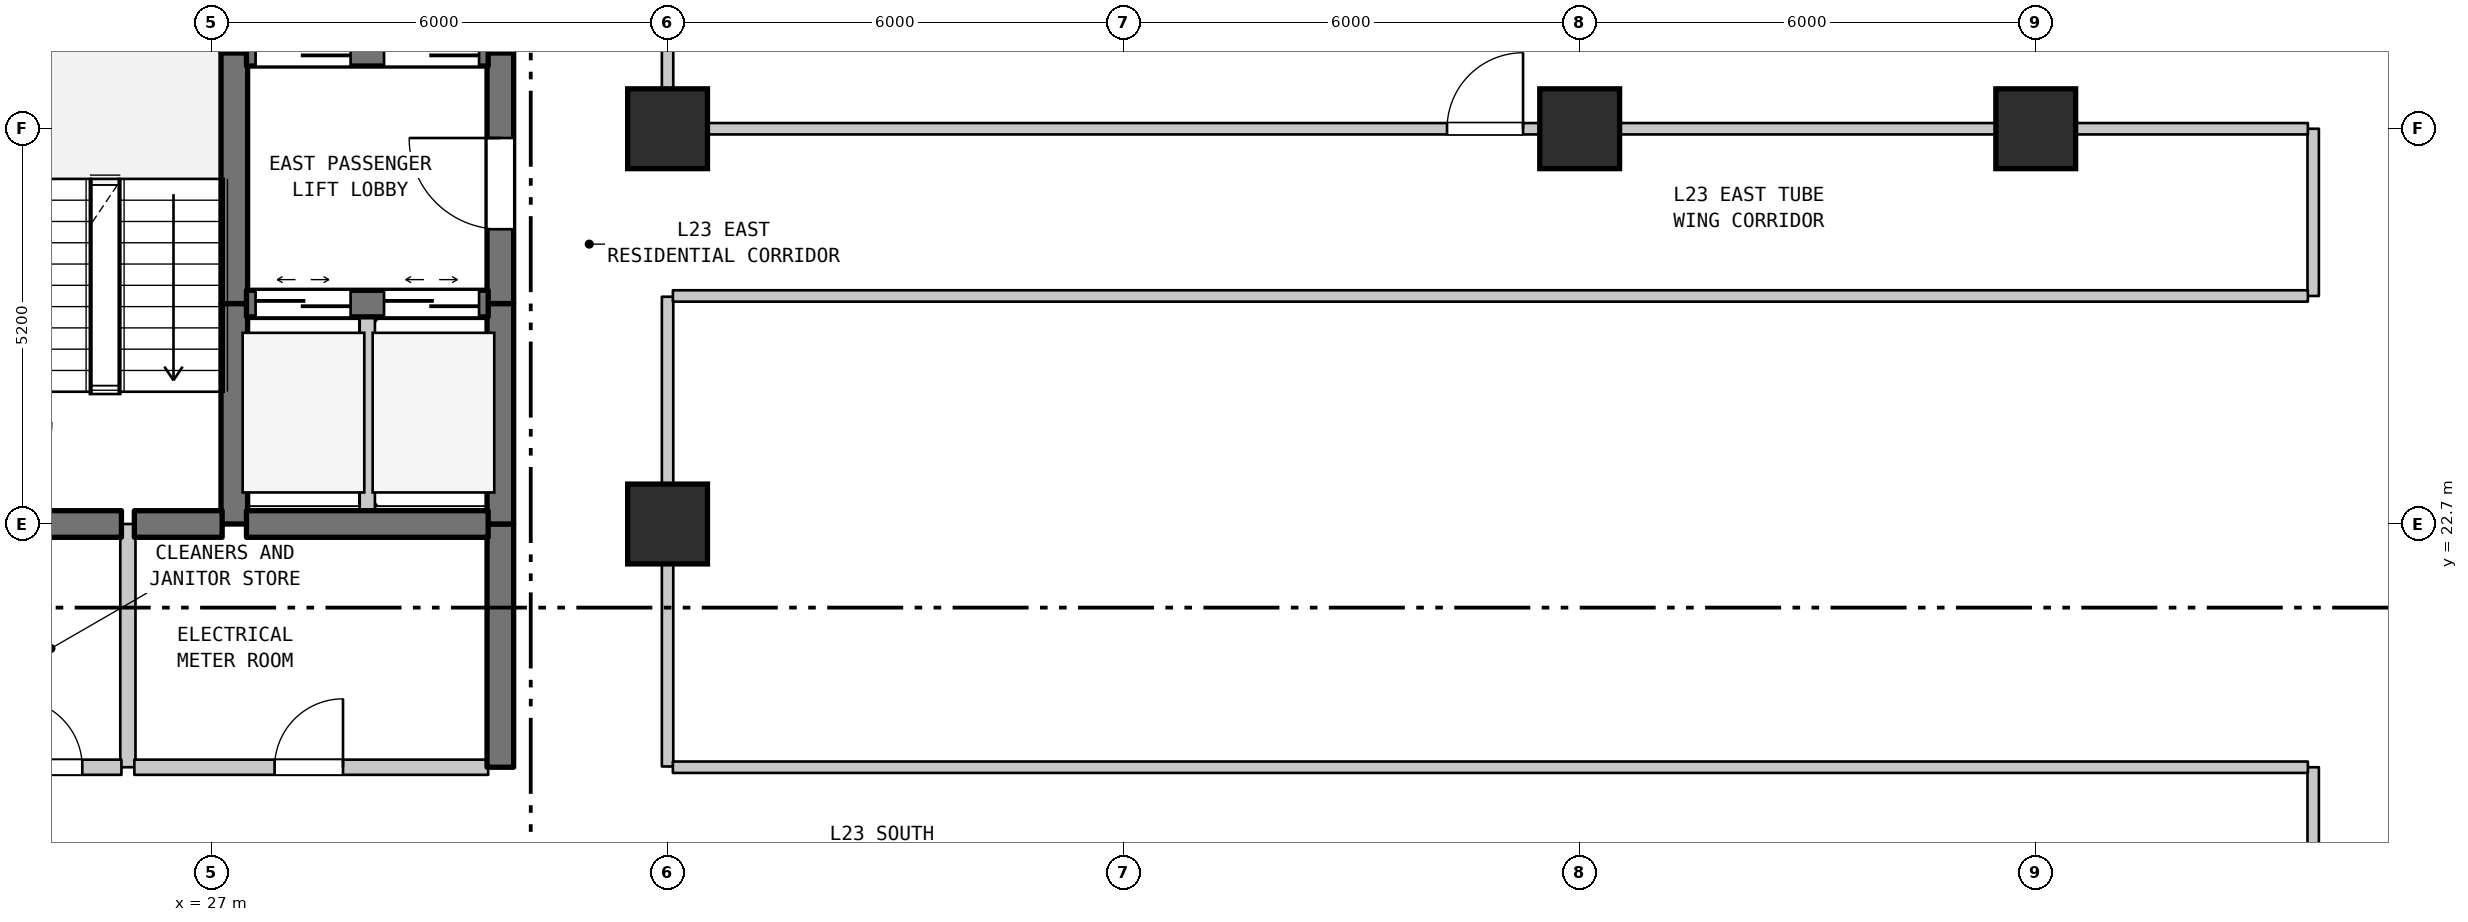
"""IFC4 building model, lengths in metres.
Left out: names, types, materials, properties, quantities, classifications, styles, units other than length and angle.
Written with IfcOpenShell. Run it as: python <this file> out.ifc"""

import sys

from ifc_helpers import new_model, si_unit, direction, frame, frame_2d, origin, origin_2d, place, context, subcontext, project, spatial, rectangle, extrude, element, fill, save


model = new_model("IFC4")
c1 = context("Model", 3, precision=1e-05, world=origin(), true_north=direction((0.0, 1.0)))
c2 = subcontext(c1, "Body", "Model", "MODEL_VIEW")
j1 = project(units=[si_unit("LENGTHUNIT", "METRE"), si_unit("PLANEANGLEUNIT", "RADIAN")], contexts=[c1])
p1 = place(None, origin())
s1 = spatial("IfcSite", under=j1, at=p1, CompositionType="ELEMENT")
p2 = place(p1, origin())
s2 = spatial("IfcBuilding", under=s1, at=p2, CompositionType="ELEMENT")
p3 = place(p2, frame((0.0, 0.0, 98.3)))
s3 = spatial("IfcBuildingStorey", under=s2, at=p3, CompositionType="ELEMENT", Elevation=98.3)
for number, where, z_axis, x_axis in (
    (1, (33.0, 22.7, 0.0), (0.0, 0.0, 1.0), (1.0, 0.0, 0.0)),
    (2, (33.0, 27.9, 0.0), (0.0, 0.0, 1.0), (1.0, 0.0, 0.0)),
    (3, (45.0, 27.9, 0.0), (0.0, 0.0, 1.0), (1.0, 0.0, 0.0)),
    (4, (51.0, 27.9, 0.0), (0.0, 0.0, 1.0), (1.0, 0.0, 0.0)),
):
    element("IfcColumn", number, at=place(p3, frame(where, z_axis=z_axis, x_axis=x_axis)), inside=s3, PredefinedType="COLUMN", context=c2, shape_type="SweptSolid", body=[
        extrude(rectangle(XDim=1.05, YDim=1.05, at=origin_2d()), origin(), (0.0, 0.0, 1.0), 3.7),
    ])
p4 = place(p3, frame((25.9, 19.5, 0.0), z_axis=(0.0, 0.0, 1.0), x_axis=(0.0, 1.0, 0.0)))
e5 = element("IfcWall", 5, at=p4, inside=s3, PredefinedType="STANDARD", context=c2, shape_type="SweptSolid", body=[
    extrude(rectangle(XDim=3.2, YDim=0.2, at=frame_2d((1.6, 0.0))), origin(), (0.0, 0.0, 1.0), 3.385),
])
p5 = place(p3, frame((27.3, 22.7, 0.0), z_axis=(0.0, 0.0, 1.0), x_axis=(0.0, 1.0, 0.0)))
e6 = element("IfcWall", 6, at=p5, inside=s3, PredefinedType="SHEAR", context=c2, shape_type="SweptSolid", body=[
    extrude(rectangle(XDim=2.9, YDim=0.35, at=frame_2d((1.45, 0.0))), origin(), (0.0, 0.0, 1.0), 3.385),
])
p6 = place(p3, frame((27.3, 25.6, 0.0), z_axis=(0.0, 0.0, 1.0), x_axis=(0.0, 1.0, 0.0)))
e7 = element("IfcWall", 7, at=p6, inside=s3, PredefinedType="SHEAR", context=c2, shape_type="SweptSolid", body=[
    extrude(rectangle(XDim=3.3, YDim=0.35, at=frame_2d((1.65, 0.0))), origin(), (0.0, 0.0, 1.0), 3.385),
])
p7 = place(p3, frame((29.05, 22.7, 0.0), z_axis=(0.0, 0.0, 1.0), x_axis=(0.0, 1.0, 0.0)))
e8 = element("IfcWall", 8, at=p7, inside=s3, PredefinedType="STANDARD", context=c2, shape_type="SweptSolid", body=[
    extrude(rectangle(XDim=2.9, YDim=0.2, at=frame_2d((1.45, 0.0))), origin(), (0.0, 0.0, 1.0), 3.385),
])
p8 = place(p3, frame((30.8, 19.5, 0.0), z_axis=(0.0, 0.0, 1.0), x_axis=(0.0, 1.0, 0.0)))
e9 = element("IfcWall", 9, at=p8, inside=s3, PredefinedType="SHEAR", context=c2, shape_type="SweptSolid", body=[
    extrude(rectangle(XDim=3.2, YDim=0.35, at=frame_2d((1.6, 0.0))), origin(), (0.0, 0.0, 1.0), 3.385),
])
p9 = place(p3, frame((30.8, 22.7, 0.0), z_axis=(0.0, 0.0, 1.0), x_axis=(0.0, 1.0, 0.0)))
e10 = element("IfcWall", 10, at=p9, inside=s3, PredefinedType="SHEAR", context=c2, shape_type="SweptSolid", body=[
    extrude(rectangle(XDim=2.9, YDim=0.35, at=frame_2d((1.45, 0.0))), origin(), (0.0, 0.0, 1.0), 3.385),
])
p10 = place(p3, frame((30.8, 25.6, 0.0), z_axis=(0.0, 0.0, 1.0), x_axis=(0.0, 1.0, 0.0)))
e11 = element("IfcWall", 11, at=p10, inside=s3, PredefinedType="SHEAR", context=c2, shape_type="SweptSolid", body=[
    extrude(rectangle(XDim=3.3, YDim=0.35, at=frame_2d((1.65, 0.0))), origin(), (0.0, 0.0, 1.0), 3.385),
])
p11 = place(p10, frame((0.978, 0.0, 0.0)))
e12 = element("IfcOpeningElement", 12, at=p11, cuts=e11, PredefinedType="OPENING", context=c2, shape_type="SweptSolid", body=[
    extrude(rectangle(XDim=1.2, YDim=2.2, at=frame_2d((0.6, 1.1))), frame((0.0, 0.185, 0.0), z_axis=(0.0, -1.0, 0.0), x_axis=(1.0, 0.0, 0.0)), (0.0, 0.0, 1.0), 0.37),
])
p12 = place(p3, frame((33.0, 19.51, 0.0), z_axis=(0.0, 0.0, 1.0), x_axis=(0.0, 1.0, 0.0)))
e13 = element("IfcWall", 13, at=p12, inside=s3, PredefinedType="STANDARD", context=c2, shape_type="SweptSolid", body=[
    extrude(rectangle(XDim=6.18, YDim=0.15, at=frame_2d((3.09, 0.0))), origin(), (0.0, 0.0, 1.0), 2.935),
])
p13 = place(p3, frame((33.0, 27.91, 0.0), z_axis=(0.0, 0.0, 1.0), x_axis=(0.0, 1.0, 0.0)))
e14 = element("IfcWall", 14, at=p13, inside=s3, PredefinedType="STANDARD", context=c2, shape_type="SweptSolid", body=[
    extrude(rectangle(XDim=9.98, YDim=0.15, at=frame_2d((4.99, 0.0))), origin(), (0.0, 0.0, 1.0), 2.885),
])
p14 = place(p3, frame((54.65, 17.31, 0.0), z_axis=(0.0, 0.0, 1.0), x_axis=(0.0, 1.0, 0.0)))
e15 = element("IfcWall", 15, at=p14, inside=s3, PredefinedType="STANDARD", context=c2, shape_type="SweptSolid", body=[
    extrude(rectangle(XDim=2.19, YDim=0.15, at=frame_2d((1.095, 0.0))), origin(), (0.0, 0.0, 1.0), 3.385),
])
p15 = place(p3, frame((54.65, 25.7, 0.0), z_axis=(0.0, 0.0, 1.0), x_axis=(0.0, 1.0, 0.0)))
e16 = element("IfcWall", 16, at=p15, inside=s3, PredefinedType="STANDARD", context=c2, shape_type="SweptSolid", body=[
    extrude(rectangle(XDim=2.2, YDim=0.15, at=frame_2d((1.1, 0.0))), origin(), (0.0, 0.0, 1.0), 3.385),
])
p16 = place(p3, frame((23.96, 19.5, 0.0), z_axis=(0.0, 0.0, 1.0), x_axis=(1.0, 0.0, 0.0)))
e17 = element("IfcWall", 17, at=p16, inside=s3, PredefinedType="STANDARD", context=c2, shape_type="SweptSolid", body=[
    extrude(rectangle(XDim=1.855, YDim=0.2, at=frame_2d((0.927, 0.0))), origin(), (0.0, 0.0, 1.0), 3.385),
])
p17 = place(p16, frame((0.44, 0.0, 0.0)))
e18 = element("IfcOpeningElement", 18, at=p17, cuts=e17, PredefinedType="OPENING", context=c2, shape_type="SweptSolid", body=[
    extrude(rectangle(XDim=0.9, YDim=2.15, at=frame_2d((0.45, 1.075))), frame((0.0, 0.11, 0.0), z_axis=(0.0, -1.0, 0.0), x_axis=(1.0, 0.0, 0.0)), (0.0, 0.0, 1.0), 0.22),
])
p18 = place(p3, frame((25.985, 19.5, 0.0), z_axis=(0.0, 0.0, 1.0), x_axis=(1.0, 0.0, 0.0)))
e19 = element("IfcWall", 19, at=p18, inside=s3, PredefinedType="STANDARD", context=c2, shape_type="SweptSolid", body=[
    extrude(rectangle(XDim=4.655, YDim=0.2, at=frame_2d((2.327, 0.0))), origin(), (0.0, 0.0, 1.0), 3.385),
])
p19 = place(p18, frame((1.845, 0.0, 0.0)))
e20 = element("IfcOpeningElement", 20, at=p19, cuts=e19, PredefinedType="OPENING", context=c2, shape_type="SweptSolid", body=[
    extrude(rectangle(XDim=0.9, YDim=2.15, at=frame_2d((0.45, 1.075))), frame((0.0, 0.11, 0.0), z_axis=(0.0, -1.0, 0.0), x_axis=(1.0, 0.0, 0.0)), (0.0, 0.0, 1.0), 0.22),
])
p20 = place(p3, frame((33.07, 19.5, 0.0), z_axis=(0.0, 0.0, 1.0), x_axis=(1.0, 0.0, 0.0)))
e21 = element("IfcWall", 21, at=p20, inside=s3, PredefinedType="STANDARD", context=c2, shape_type="SweptSolid", body=[
    extrude(rectangle(XDim=21.51, YDim=0.15, at=frame_2d((10.755, 0.0))), origin(), (0.0, 0.0, 1.0), 3.385),
])
p21 = place(p3, frame((23.96, 22.7, 0.0), z_axis=(0.0, 0.0, 1.0), x_axis=(1.0, 0.0, 0.0)))
e22 = element("IfcWall", 22, at=p21, inside=s3, PredefinedType="SHEAR", context=c2, shape_type="SweptSolid", body=[
    extrude(rectangle(XDim=1.855, YDim=0.35, at=frame_2d((0.927, 0.0))), origin(), (0.0, 0.0, 1.0), 3.385),
])
p22 = place(p3, frame((25.985, 22.7, 0.0), z_axis=(0.0, 0.0, 1.0), x_axis=(1.0, 0.0, 0.0)))
e23 = element("IfcWall", 23, at=p22, inside=s3, PredefinedType="SHEAR", context=c2, shape_type="SweptSolid", body=[
    extrude(rectangle(XDim=1.155, YDim=0.35, at=frame_2d((0.577, 0.0))), origin(), (0.0, 0.0, 1.0), 3.385),
])
p23 = place(p3, frame((27.46, 22.7, 0.0), z_axis=(0.0, 0.0, 1.0), x_axis=(1.0, 0.0, 0.0)))
e24 = element("IfcWall", 24, at=p23, inside=s3, PredefinedType="SHEAR", context=c2, shape_type="SweptSolid", body=[
    extrude(rectangle(XDim=3.18, YDim=0.35, at=frame_2d((1.59, 0.0))), origin(), (0.0, 0.0, 1.0), 3.385),
])
p24 = place(p3, frame((27.46, 25.6, 0.0), z_axis=(0.0, 0.0, 1.0), x_axis=(1.0, 0.0, 0.0)))
e25 = element("IfcWall", 25, at=p24, inside=s3, PredefinedType="SHEAR", context=c2, shape_type="SweptSolid", body=[
    extrude(rectangle(XDim=3.18, YDim=0.35, at=frame_2d((1.59, 0.0))), origin(), (0.0, 0.0, 1.0), 3.385),
])
p25 = place(p24, frame((0.12, 0.0, 0.0)))
e26 = element("IfcOpeningElement", 26, at=p25, cuts=e25, PredefinedType="OPENING", context=c2, shape_type="SweptSolid", body=[
    extrude(rectangle(XDim=1.25, YDim=2.2, at=frame_2d((0.625, 1.1))), frame((0.0, 0.185, 0.0), z_axis=(0.0, -1.0, 0.0), x_axis=(1.0, 0.0, 0.0)), (0.0, 0.0, 1.0), 0.37),
])
p26 = place(p24, frame((1.81, 0.0, 0.0)))
e27 = element("IfcOpeningElement", 27, at=p26, cuts=e25, PredefinedType="OPENING", context=c2, shape_type="SweptSolid", body=[
    extrude(rectangle(XDim=1.25, YDim=2.2, at=frame_2d((0.625, 1.1))), frame((0.0, 0.185, 0.0), z_axis=(0.0, -1.0, 0.0), x_axis=(1.0, 0.0, 0.0)), (0.0, 0.0, 1.0), 0.37),
])
p27 = place(p3, frame((33.07, 25.7, 0.0), z_axis=(0.0, 0.0, 1.0), x_axis=(1.0, 0.0, 0.0)))
e28 = element("IfcWall", 28, at=p27, inside=s3, PredefinedType="STANDARD", context=c2, shape_type="SweptSolid", body=[
    extrude(rectangle(XDim=21.51, YDim=0.15, at=frame_2d((10.755, 0.0))), origin(), (0.0, 0.0, 1.0), 3.385),
])
p28 = place(p3, frame((33.07, 27.9, 0.0), z_axis=(0.0, 0.0, 1.0), x_axis=(1.0, 0.0, 0.0)))
e29 = element("IfcWall", 29, at=p28, inside=s3, PredefinedType="STANDARD", context=c2, shape_type="SweptSolid", body=[
    extrude(rectangle(XDim=11.93, YDim=0.15, at=frame_2d((5.965, 0.0))), origin(), (0.0, 0.0, 1.0), 2.885),
])
p29 = place(p28, frame((10.185, 0.0, 0.0)))
e30 = element("IfcOpeningElement", 30, at=p29, cuts=e29, PredefinedType="OPENING", context=c2, shape_type="SweptSolid", body=[
    extrude(rectangle(XDim=1.0, YDim=2.15, at=frame_2d((0.5, 1.075))), frame((0.0, 0.085, 0.0), z_axis=(0.0, -1.0, 0.0), x_axis=(1.0, 0.0, 0.0)), (0.0, 0.0, 1.0), 0.17),
])
p30 = place(p3, frame((27.46, 28.9, 0.0), z_axis=(0.0, 0.0, 1.0), x_axis=(1.0, 0.0, 0.0)))
e31 = element("IfcWall", 31, at=p30, inside=s3, PredefinedType="SHEAR", context=c2, shape_type="SweptSolid", body=[
    extrude(rectangle(XDim=3.18, YDim=0.35, at=frame_2d((1.59, 0.0))), origin(), (0.0, 0.0, 1.0), 3.385),
])
p31 = place(p30, frame((0.12, 0.0, 0.0)))
e32 = element("IfcOpeningElement", 32, at=p31, cuts=e31, PredefinedType="OPENING", context=c2, shape_type="SweptSolid", body=[
    extrude(rectangle(XDim=1.25, YDim=2.2, at=frame_2d((0.625, 1.1))), frame((0.0, 0.185, 0.0), z_axis=(0.0, -1.0, 0.0), x_axis=(1.0, 0.0, 0.0)), (0.0, 0.0, 1.0), 0.37),
])
p32 = place(p30, frame((1.81, 0.0, 0.0)))
e33 = element("IfcOpeningElement", 33, at=p32, cuts=e31, PredefinedType="OPENING", context=c2, shape_type="SweptSolid", body=[
    extrude(rectangle(XDim=1.25, YDim=2.2, at=frame_2d((0.625, 1.1))), frame((0.0, 0.185, 0.0), z_axis=(0.0, -1.0, 0.0), x_axis=(1.0, 0.0, 0.0)), (0.0, 0.0, 1.0), 0.37),
])
p33 = place(p3, frame((45.0, 27.9, 0.0), z_axis=(0.0, 0.0, 1.0), x_axis=(1.0, 0.0, 0.0)))
e34 = element("IfcWall", 34, at=p33, inside=s3, PredefinedType="STANDARD", context=c2, shape_type="SweptSolid", body=[
    extrude(rectangle(XDim=9.58, YDim=0.15, at=frame_2d((4.79, 0.0))), origin(), (0.0, 0.0, 1.0), 2.935),
])
p34 = place(p11, origin())
e35 = element("IfcDoor", 35, at=p34, inside=s3, OperationType="SINGLE_SWING_RIGHT", PredefinedType="DOOR", context=c2, shape_type="SweptSolid", body=[
    extrude(rectangle(XDim=1.2, YDim=2.2, at=frame_2d((0.6, 1.1))), frame((0.0, 0.025, 0.0), z_axis=(0.0, -1.0, 0.0), x_axis=(1.0, 0.0, 0.0)), (0.0, 0.0, 1.0), 0.05),
])
fill(e12, e35)
p35 = place(p17, origin())
e36 = element("IfcDoor", 36, at=p35, inside=s3, OperationType="SINGLE_SWING_LEFT", PredefinedType="DOOR", context=c2, shape_type="SweptSolid", body=[
    extrude(rectangle(XDim=0.9, YDim=2.15, at=frame_2d((0.45, 1.075))), frame((0.0, 0.025, 0.0), z_axis=(0.0, -1.0, 0.0), x_axis=(1.0, 0.0, 0.0)), (0.0, 0.0, 1.0), 0.05),
])
fill(e18, e36)
p36 = place(p19, origin())
e37 = element("IfcDoor", 37, at=p36, inside=s3, OperationType="SINGLE_SWING_RIGHT", PredefinedType="DOOR", context=c2, shape_type="SweptSolid", body=[
    extrude(rectangle(XDim=0.9, YDim=2.15, at=frame_2d((0.45, 1.075))), frame((0.0, 0.025, 0.0), z_axis=(0.0, -1.0, 0.0), x_axis=(1.0, 0.0, 0.0)), (0.0, 0.0, 1.0), 0.05),
])
fill(e20, e37)
p37 = place(p25, origin())
e38 = element("IfcDoor", 38, at=p37, inside=s3, OperationType="DOUBLE_DOOR_SLIDING", PredefinedType="DOOR", context=c2, shape_type="SweptSolid", body=[
    extrude(rectangle(XDim=1.25, YDim=2.2, at=frame_2d((0.625, 1.1))), frame((0.0, 0.025, 0.0), z_axis=(0.0, -1.0, 0.0), x_axis=(1.0, 0.0, 0.0)), (0.0, 0.0, 1.0), 0.05),
])
fill(e26, e38)
p38 = place(p26, origin())
e39 = element("IfcDoor", 39, at=p38, inside=s3, OperationType="DOUBLE_DOOR_SLIDING", PredefinedType="DOOR", context=c2, shape_type="SweptSolid", body=[
    extrude(rectangle(XDim=1.25, YDim=2.2, at=frame_2d((0.625, 1.1))), frame((0.0, 0.025, 0.0), z_axis=(0.0, -1.0, 0.0), x_axis=(1.0, 0.0, 0.0)), (0.0, 0.0, 1.0), 0.05),
])
fill(e27, e39)
p39 = place(p29, origin())
e40 = element("IfcDoor", 40, at=p39, inside=s3, OperationType="SINGLE_SWING_RIGHT", PredefinedType="DOOR", context=c2, shape_type="SweptSolid", body=[
    extrude(rectangle(XDim=1.0, YDim=2.15, at=frame_2d((0.5, 1.075))), frame((0.0, 0.025, 0.0), z_axis=(0.0, -1.0, 0.0), x_axis=(1.0, 0.0, 0.0)), (0.0, 0.0, 1.0), 0.05),
])
fill(e30, e40)
p40 = place(p31, origin())
e41 = element("IfcDoor", 41, at=p40, inside=s3, OperationType="DOUBLE_DOOR_SLIDING", PredefinedType="DOOR", context=c2, shape_type="SweptSolid", body=[
    extrude(rectangle(XDim=1.25, YDim=2.2, at=frame_2d((0.625, 1.1))), frame((0.0, 0.025, 0.0), z_axis=(0.0, -1.0, 0.0), x_axis=(1.0, 0.0, 0.0)), (0.0, 0.0, 1.0), 0.05),
])
fill(e32, e41)
p41 = place(p32, origin())
e42 = element("IfcDoor", 42, at=p41, inside=s3, OperationType="DOUBLE_DOOR_SLIDING", PredefinedType="DOOR", context=c2, shape_type="SweptSolid", body=[
    extrude(rectangle(XDim=1.25, YDim=2.2, at=frame_2d((0.625, 1.1))), frame((0.0, 0.025, 0.0), z_axis=(0.0, -1.0, 0.0), x_axis=(1.0, 0.0, 0.0)), (0.0, 0.0, 1.0), 0.05),
])
fill(e33, e42)
save(model, sys.argv[1])
